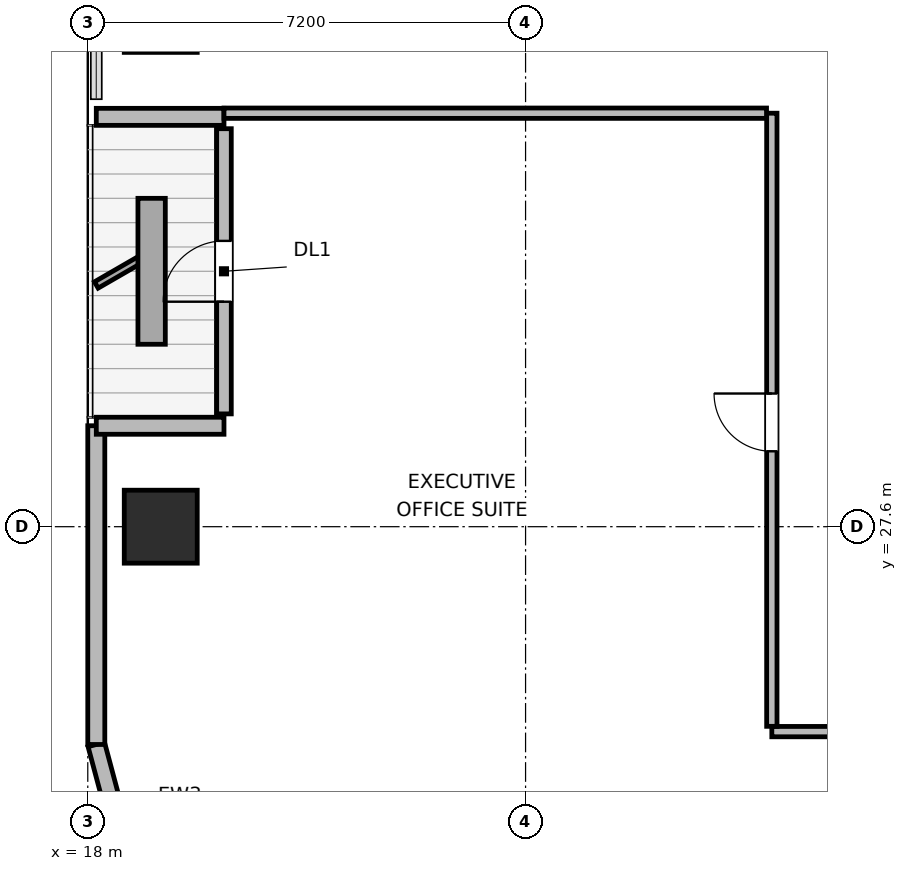
"""IFC4 building model, lengths in metres.
Left out: names, types, materials, properties, quantities, classifications, styles, units other than length and angle.
Written with IfcOpenShell. Run it as: python <this file> out.ifc"""

import sys

from ifc_helpers import new_model, si_unit, direction, frame, frame_2d, origin, origin_2d, place, context, subcontext, project, spatial, rectangle, extrude, element, fill, save


model = new_model("IFC4")
c1 = context("Model", 3, precision=1e-05, world=origin(), true_north=direction((0.0, 1.0)))
c2 = subcontext(c1, "Body", "Model", "MODEL_VIEW")
j1 = project(units=[si_unit("LENGTHUNIT", "METRE"), si_unit("PLANEANGLEUNIT", "RADIAN")], contexts=[c1])
p1 = place(None, origin())
s1 = spatial("IfcSite", under=j1, at=p1, CompositionType="ELEMENT")
p2 = place(p1, origin())
s2 = spatial("IfcBuilding", under=s1, at=p2, CompositionType="ELEMENT")
p3 = place(p2, frame((0.0, 0.0, 190.2)))
s3 = spatial("IfcBuildingStorey", under=s2, at=p3, CompositionType="ELEMENT", Elevation=190.2)
p4 = place(p3, frame((19.2, 27.6, 0.0), z_axis=(0.0, 0.0, 1.0), x_axis=(1.0, 0.0, 0.0)))
e1 = element("IfcColumn", 1, at=p4, inside=s3, PredefinedType="COLUMN", context=c2, shape_type="SweptSolid", body=[
    extrude(rectangle(XDim=1.2, YDim=1.2, at=origin_2d()), origin(), (0.0, 0.0, 1.0), 3.9),
])
p5 = place(p3, frame((18.848, 21.373, 0.0), z_axis=(0.0, 0.0, 1.0), x_axis=(-0.258672222976, 0.9659651552, 0.0)))
e2 = element("IfcWall", 2, at=p5, inside=s3, PredefinedType="SOLIDWALL", context=c2, shape_type="SweptSolid", body=[
    extrude(rectangle(XDim=2.739, YDim=0.28, at=frame_2d((1.37, 0.0))), origin(), (0.0, 0.0, 1.0), 3.68),
])
p6 = place(p3, frame((18.14, 24.018, 0.0), z_axis=(0.0, 0.0, 1.0), x_axis=(0.0, 1.0, 0.0)))
e3 = element("IfcWall", 3, at=p6, inside=s3, PredefinedType="SOLIDWALL", context=c2, shape_type="SweptSolid", body=[
    extrude(rectangle(XDim=5.242, YDim=0.28, at=frame_2d((2.621, 0.0))), origin(), (0.0, 0.0, 1.0), 3.68),
])
p7 = place(p3, frame((18.14, 29.26, 0.0), z_axis=(0.0, 0.0, 1.0), x_axis=(1.0, 0.0, 0.0)))
e4 = element("IfcWall", 4, at=p7, inside=s3, PredefinedType="SOLIDWALL", context=c2, shape_type="SweptSolid", body=[
    extrude(rectangle(XDim=2.1, YDim=0.28, at=frame_2d((1.05, 0.0))), origin(), (0.0, 0.0, 1.0), 3.116),
])
p8 = place(p3, frame((20.24, 29.455, 0.0), z_axis=(0.0, 0.0, 1.0), x_axis=(0.0, 1.0, 0.0)))
e5 = element("IfcWall", 5, at=p8, inside=s3, PredefinedType="SOLIDWALL", context=c2, shape_type="SweptSolid", body=[
    extrude(rectangle(XDim=4.69, YDim=0.24, at=frame_2d((2.345, 0.0))), origin(), (0.0, 0.0, 1.0), 3.248),
])
p9 = place(p8, frame((1.845, 0.0, 0.0)))
e6 = element("IfcOpeningElement", 6, at=p9, cuts=e5, PredefinedType="OPENING", context=c2, shape_type="SweptSolid", body=[
    extrude(rectangle(XDim=1.0, YDim=2.02, at=frame_2d((0.5, 1.01))), frame((0.0, 0.13, 0.0), z_axis=(0.0, -1.0, 0.0), x_axis=(1.0, 0.0, 0.0)), (0.0, 0.0, 1.0), 0.26),
])
p10 = place(p3, frame((20.24, 34.34, 0.0), z_axis=(0.0, 0.0, 1.0), x_axis=(-1.0, 0.0, 0.0)))
e7 = element("IfcWall", 7, at=p10, inside=s3, PredefinedType="SOLIDWALL", context=c2, shape_type="SweptSolid", body=[
    extrude(rectangle(XDim=2.1, YDim=0.28, at=frame_2d((1.05, 0.0))), origin(), (0.0, 0.0, 1.0), 3.116),
])
p11 = place(p3, frame((29.25, 24.23, 0.0), z_axis=(0.0, 0.0, 1.0), x_axis=(1.0, 0.0, 0.0)))
e8 = element("IfcWall", 8, at=p11, inside=s3, PredefinedType="PARTITIONING", context=c2, shape_type="SweptSolid", body=[
    extrude(rectangle(XDim=34.35, YDim=0.17, at=frame_2d((17.175, 0.0))), origin(), (0.0, 0.0, 1.0), 3.68),
])
p12 = place(p11, frame((4.12, 0.0, 0.0)))
e9 = element("IfcOpeningElement", 9, at=p12, cuts=e8, PredefinedType="OPENING", context=c2, shape_type="SweptSolid", body=[
    extrude(rectangle(XDim=0.95, YDim=2.04, at=frame_2d((0.475, 1.02))), frame((0.0, 0.095, 0.0), z_axis=(0.0, -1.0, 0.0), x_axis=(1.0, 0.0, 0.0)), (0.0, 0.0, 1.0), 0.19),
])
p13 = place(p11, frame((12.705, 0.0, 0.0)))
e10 = element("IfcOpeningElement", 10, at=p13, cuts=e8, PredefinedType="OPENING", context=c2, shape_type="SweptSolid", body=[
    extrude(rectangle(XDim=0.95, YDim=2.04, at=frame_2d((0.475, 1.02))), frame((0.0, 0.095, 0.0), z_axis=(0.0, -1.0, 0.0), x_axis=(1.0, 0.0, 0.0)), (0.0, 0.0, 1.0), 0.19),
])
p14 = place(p11, frame((20.69, 0.0, 0.0)))
e11 = element("IfcOpeningElement", 11, at=p14, cuts=e8, PredefinedType="OPENING", context=c2, shape_type="SweptSolid", body=[
    extrude(rectangle(XDim=0.95, YDim=2.04, at=frame_2d((0.475, 1.02))), frame((0.0, 0.095, 0.0), z_axis=(0.0, -1.0, 0.0), x_axis=(1.0, 0.0, 0.0)), (0.0, 0.0, 1.0), 0.19),
])
p15 = place(p11, frame((29.28, 0.0, 0.0)))
e12 = element("IfcOpeningElement", 12, at=p15, cuts=e8, PredefinedType="OPENING", context=c2, shape_type="SweptSolid", body=[
    extrude(rectangle(XDim=0.95, YDim=2.04, at=frame_2d((0.475, 1.02))), frame((0.0, 0.095, 0.0), z_axis=(0.0, -1.0, 0.0), x_axis=(1.0, 0.0, 0.0)), (0.0, 0.0, 1.0), 0.19),
])
p16 = place(p3, frame((29.25, 24.317, 0.0), z_axis=(0.0, 0.0, 1.0), x_axis=(0.0, 1.0, 0.0)))
e13 = element("IfcWall", 13, at=p16, inside=s3, PredefinedType="PARTITIONING", context=c2, shape_type="SweptSolid", body=[
    extrude(rectangle(XDim=10.083, YDim=0.17, at=frame_2d((5.042, 0.0))), origin(), (0.0, 0.0, 1.0), 3.68),
])
p17 = place(p16, frame((4.523, 0.0, 0.0)))
e14 = element("IfcOpeningElement", 14, at=p17, cuts=e13, PredefinedType="OPENING", context=c2, shape_type="SweptSolid", body=[
    extrude(rectangle(XDim=0.95, YDim=2.04, at=frame_2d((0.475, 1.02))), frame((0.0, 0.095, 0.0), z_axis=(0.0, -1.0, 0.0), x_axis=(1.0, 0.0, 0.0)), (0.0, 0.0, 1.0), 0.19),
])
p18 = place(p3, frame((20.24, 34.4, 0.0), z_axis=(0.0, 0.0, 1.0), x_axis=(1.0, 0.0, 0.0)))
e15 = element("IfcWall", 15, at=p18, inside=s3, PredefinedType="PARTITIONING", context=c2, shape_type="SweptSolid", body=[
    extrude(rectangle(XDim=8.923, YDim=0.17, at=frame_2d((4.461, 0.0))), origin(), (0.0, 0.0, 1.0), 3.68),
])
p19 = place(p9, origin())
e16 = element("IfcDoor", 16, at=p19, inside=s3, OperationType="SINGLE_SWING_LEFT", PredefinedType="DOOR", context=c2, shape_type="SweptSolid", body=[
    extrude(rectangle(XDim=1.0, YDim=2.02, at=frame_2d((0.5, 1.01))), frame((0.0, 0.025, 0.0), z_axis=(0.0, -1.0, 0.0), x_axis=(1.0, 0.0, 0.0)), (0.0, 0.0, 1.0), 0.05),
])
fill(e6, e16)
p20 = place(p17, origin())
e17 = element("IfcDoor", 17, at=p20, inside=s3, OperationType="SINGLE_SWING_RIGHT", PredefinedType="DOOR", context=c2, shape_type="SweptSolid", body=[
    extrude(rectangle(XDim=0.95, YDim=2.04, at=frame_2d((0.475, 1.02))), frame((0.0, 0.025, 0.0), z_axis=(0.0, -1.0, 0.0), x_axis=(1.0, 0.0, 0.0)), (0.0, 0.0, 1.0), 0.05),
])
fill(e14, e17)
save(model, sys.argv[1])
